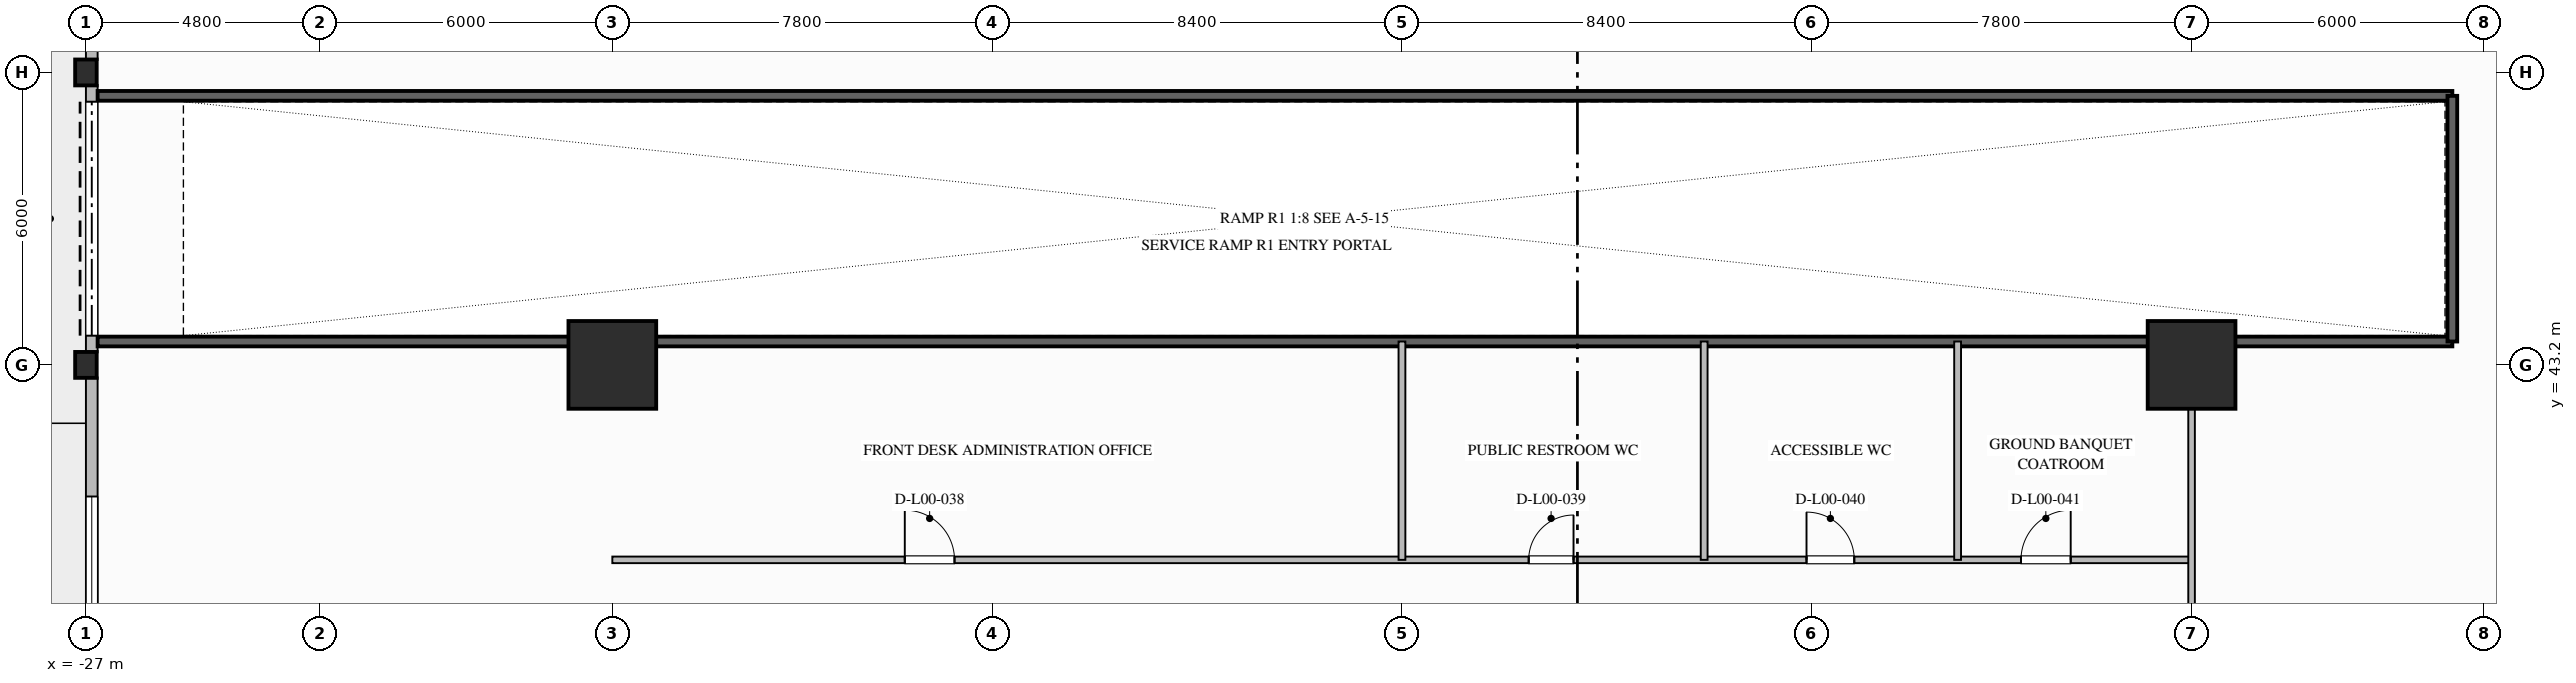
"""IFC4 building model, lengths in metres.
Left out: names, types, materials, properties, quantities, classifications, styles, units other than length and angle.
Written with IfcOpenShell. Run it as: python <this file> out.ifc"""

import sys

from ifc_helpers import new_model, si_unit, direction, frame, frame_2d, origin, origin_2d, place, context, subcontext, project, spatial, rectangle, i_section, extrude, element, fill, save


model = new_model("IFC4")
c1 = context("Model", 3, precision=1e-05, world=origin(), true_north=direction((0.0, 1.0)))
c2 = subcontext(c1, "Body", "Model", "MODEL_VIEW")
j1 = project(units=[si_unit("LENGTHUNIT", "METRE"), si_unit("PLANEANGLEUNIT", "RADIAN")], contexts=[c1])
p1 = place(None, origin())
s1 = spatial("IfcSite", under=j1, at=p1, CompositionType="ELEMENT")
p2 = place(p1, origin())
s2 = spatial("IfcBuilding", under=s1, at=p2, CompositionType="ELEMENT")
p3 = place(p2, origin())
s3 = spatial("IfcBuildingStorey", under=s2, at=p3, CompositionType="ELEMENT", Elevation=0.0)
for number, where, z_axis, x_axis in (
    (1, (-16.2, 43.2, 0.0), (0.0, 0.0, 1.0), (1.0, 0.0, 0.0)),
    (2, (16.2, 43.2, 0.0), (0.0, 0.0, 1.0), (1.0, 0.0, 0.0)),
):
    element("IfcColumn", number, at=place(p3, frame(where, z_axis=z_axis, x_axis=x_axis)), inside=s3, PredefinedType="COLUMN", context=c2, shape_type="SweptSolid", body=[
        extrude(rectangle(XDim=1.8, YDim=1.8, at=origin_2d()), origin(), (0.0, 0.0, 1.0), 5.6),
    ])
for number, where, z_axis, x_axis in (
    (3, (-27.0, 43.2, 0.0), (0.0, 0.0, 1.0), (1.0, 0.0, 0.0)),
    (4, (-27.0, 49.2, 0.0), (0.0, 0.0, 1.0), (1.0, 0.0, 0.0)),
):
    element("IfcColumn", number, at=place(p3, frame(where, z_axis=z_axis, x_axis=x_axis)), inside=s3, PredefinedType="COLUMN", context=c2, shape_type="SweptSolid", body=[
        extrude(i_section(OverallWidth=0.442, OverallDepth=0.531, WebThickness=0.066, FlangeThickness=0.106, FilletRadius=0.03, at=origin_2d()), origin(), (0.0, 0.0, 1.0), 5.6),
    ])
p4 = place(p3, frame((-26.88, 35.658, 0.0), z_axis=(0.0, 0.0, 1.0), x_axis=(0.0, 1.0, 0.0)))
e5 = element("IfcWall", 5, at=p4, inside=s3, PredefinedType="STANDARD", context=c2, shape_type="SweptSolid", body=[
    extrude(rectangle(XDim=7.285, YDim=0.24, at=frame_2d((3.642, 0.0))), origin(), (0.0, 0.0, 1.0), 4.604),
])
p5 = place(p4, frame((2.442, 0.0, 0.9)))
e6 = element("IfcOpeningElement", 6, at=p5, cuts=e5, PredefinedType="OPENING", context=c2, shape_type="SweptSolid", body=[
    extrude(rectangle(XDim=2.4, YDim=2.6, at=frame_2d((1.2, 1.3))), frame((0.0, 0.13, 0.0), z_axis=(0.0, -1.0, 0.0), x_axis=(1.0, 0.0, 0.0)), (0.0, 0.0, 1.0), 0.26),
])
p6 = place(p3, frame((-26.88, 43.458, 0.0), z_axis=(0.0, 0.0, 1.0), x_axis=(0.0, 1.0, 0.0)))
e7 = element("IfcWall", 7, at=p6, inside=s3, PredefinedType="STANDARD", context=c2, shape_type="SweptSolid", body=[
    extrude(rectangle(XDim=5.485, YDim=0.24, at=frame_2d((2.742, 0.0))), origin(), (0.0, 0.0, 1.0), 4.604),
])
p7 = place(p6, frame((0.342, 0.0, 0.0)))
e8 = element("IfcOpeningElement", 8, at=p7, cuts=e7, PredefinedType="OPENING", context=c2, shape_type="SweptSolid", body=[
    extrude(rectangle(XDim=4.8, YDim=4.5, at=frame_2d((2.4, 2.25))), frame((0.0, 0.13, 0.0), z_axis=(0.0, -1.0, 0.0), x_axis=(1.0, 0.0, 0.0)), (0.0, 0.0, 1.0), 0.26),
])
p8 = place(p3, frame((-26.88, 49.458, 0.0), z_axis=(0.0, 0.0, 1.0), x_axis=(0.0, 1.0, 0.0)))
e9 = element("IfcWall", 9, at=p8, inside=s3, PredefinedType="STANDARD", context=c2, shape_type="SweptSolid", body=[
    extrude(rectangle(XDim=1.542, YDim=0.24, at=frame_2d((0.771, 0.0))), origin(), (0.0, 0.0, 1.0), 5.3),
])
for number, where, z_axis, x_axis in (
    (10, (-26.76, 43.68, 0.0), (0.0, 0.0, 1.0), (1.0, 0.0, 0.0)),
    (11, (-26.76, 48.72, 0.0), (0.0, 0.0, 1.0), (1.0, 0.0, 0.0)),
):
    element("IfcWall", number, at=place(p3, frame(where, z_axis=z_axis, x_axis=x_axis)), inside=s3, PredefinedType="SOLIDWALL", context=c2, shape_type="SweptSolid", body=[
        extrude(rectangle(XDim=48.31, YDim=0.2, at=frame_2d((24.155, 0.0))), origin(), (0.0, 0.0, 1.0), 5.3),
    ])
p9 = place(p3, frame((21.55, 43.68, 0.0), z_axis=(0.0, 0.0, 1.0), x_axis=(0.0, 1.0, 0.0)))
e12 = element("IfcWall", 12, at=p9, inside=s3, PredefinedType="SOLIDWALL", context=c2, shape_type="SweptSolid", body=[
    extrude(rectangle(XDim=5.04, YDim=0.2, at=frame_2d((2.52, 0.0))), origin(), (0.0, 0.0, 1.0), 5.3),
])
p10 = place(p3, frame((-16.2, 39.2, 0.0), z_axis=(0.0, 0.0, 1.0), x_axis=(1.0, 0.0, 0.0)))
e13 = element("IfcWall", 13, at=p10, inside=s3, PredefinedType="PARTITIONING", context=c2, shape_type="SweptSolid", body=[
    extrude(rectangle(XDim=32.4, YDim=0.135, at=frame_2d((16.2, 0.0))), origin(), (0.0, 0.0, 1.0), 5.3),
])
p11 = place(p10, frame((6.0, 0.0, 0.0)))
e14 = element("IfcOpeningElement", 14, at=p11, cuts=e13, PredefinedType="OPENING", context=c2, shape_type="SweptSolid", body=[
    extrude(rectangle(XDim=1.02, YDim=2.15, at=frame_2d((0.51, 1.075))), frame((0.0, 0.077, 0.0), z_axis=(0.0, -1.0, 0.0), x_axis=(1.0, 0.0, 0.0)), (0.0, 0.0, 1.0), 0.155),
])
p12 = place(p10, frame((18.8, 0.0, 0.0)))
e15 = element("IfcOpeningElement", 15, at=p12, cuts=e13, PredefinedType="OPENING", context=c2, shape_type="SweptSolid", body=[
    extrude(rectangle(XDim=0.92, YDim=2.1, at=frame_2d((0.46, 1.05))), frame((0.0, 0.077, 0.0), z_axis=(0.0, -1.0, 0.0), x_axis=(1.0, 0.0, 0.0)), (0.0, 0.0, 1.0), 0.155),
])
p13 = place(p10, frame((24.5, 0.0, 0.0)))
e16 = element("IfcOpeningElement", 16, at=p13, cuts=e13, PredefinedType="OPENING", context=c2, shape_type="SweptSolid", body=[
    extrude(rectangle(XDim=0.98, YDim=2.1, at=frame_2d((0.49, 1.05))), frame((0.0, 0.077, 0.0), z_axis=(0.0, -1.0, 0.0), x_axis=(1.0, 0.0, 0.0)), (0.0, 0.0, 1.0), 0.155),
])
p14 = place(p10, frame((28.9, 0.0, 0.0)))
e17 = element("IfcOpeningElement", 17, at=p14, cuts=e13, PredefinedType="OPENING", context=c2, shape_type="SweptSolid", body=[
    extrude(rectangle(XDim=1.02, YDim=2.15, at=frame_2d((0.51, 1.075))), frame((0.0, 0.077, 0.0), z_axis=(0.0, -1.0, 0.0), x_axis=(1.0, 0.0, 0.0)), (0.0, 0.0, 1.0), 0.155),
])
p15 = place(p3, frame((16.2, 30.6, 0.0), z_axis=(0.0, 0.0, 1.0), x_axis=(0.0, 1.0, 0.0)))
e18 = element("IfcWall", 18, at=p15, inside=s3, PredefinedType="PARTITIONING", context=c2, shape_type="SweptSolid", body=[
    extrude(rectangle(XDim=13.08, YDim=0.135, at=frame_2d((6.54, 0.0))), origin(), (0.0, 0.0, 1.0), 4.337),
])
p16 = place(p3, frame((0.0, 39.2, 0.0), z_axis=(0.0, 0.0, 1.0), x_axis=(0.0, 1.0, 0.0)))
e19 = element("IfcWall", 19, at=p16, inside=s3, PredefinedType="PLUMBINGWALL", context=c2, shape_type="SweptSolid", body=[
    extrude(rectangle(XDim=4.48, YDim=0.14, at=frame_2d((2.24, 0.0))), origin(), (0.0, 0.0, 1.0), 4.512),
])
for number, where, z_axis, x_axis in (
    (20, (6.2, 39.2, 0.0), (0.0, 0.0, 1.0), (0.0, 1.0, 0.0)),
    (21, (11.4, 39.2, 0.0), (0.0, 0.0, 1.0), (0.0, 1.0, 0.0)),
):
    element("IfcWall", number, at=place(p3, frame(where, z_axis=z_axis, x_axis=x_axis)), inside=s3, PredefinedType="PLUMBINGWALL", context=c2, shape_type="SweptSolid", body=[
        extrude(rectangle(XDim=4.48, YDim=0.14, at=frame_2d((2.24, 0.0))), origin(), (0.0, 0.0, 1.0), 5.3),
    ])
p17 = place(p5, origin())
e22 = element("IfcWindow", 22, at=p17, inside=s3, PartitioningType="SINGLE_PANEL", PredefinedType="WINDOW", context=c2, shape_type="SweptSolid", body=[
    extrude(rectangle(XDim=2.4, YDim=2.6, at=frame_2d((1.2, 1.3))), frame((0.0, 0.03, 0.0), z_axis=(0.0, -1.0, 0.0), x_axis=(1.0, 0.0, 0.0)), (0.0, 0.0, 1.0), 0.06),
])
fill(e6, e22)
p18 = place(p7, origin())
e23 = element("IfcDoor", 23, at=p18, inside=s3, OperationType="ROLLINGUP", PredefinedType="GATE", context=c2, shape_type="SweptSolid", body=[
    extrude(rectangle(XDim=4.8, YDim=4.5, at=frame_2d((2.4, 2.25))), frame((0.0, 0.025, 0.0), z_axis=(0.0, -1.0, 0.0), x_axis=(1.0, 0.0, 0.0)), (0.0, 0.0, 1.0), 0.05),
])
fill(e8, e23)
p19 = place(p11, origin())
e24 = element("IfcDoor", 24, at=p19, inside=s3, OperationType="SINGLE_SWING_LEFT", PredefinedType="DOOR", context=c2, shape_type="SweptSolid", body=[
    extrude(rectangle(XDim=1.02, YDim=2.15, at=frame_2d((0.51, 1.075))), frame((0.0, 0.025, 0.0), z_axis=(0.0, -1.0, 0.0), x_axis=(1.0, 0.0, 0.0)), (0.0, 0.0, 1.0), 0.05),
])
fill(e14, e24)
p20 = place(p12, origin())
e25 = element("IfcDoor", 25, at=p20, inside=s3, OperationType="SINGLE_SWING_RIGHT", PredefinedType="DOOR", context=c2, shape_type="SweptSolid", body=[
    extrude(rectangle(XDim=0.92, YDim=2.1, at=frame_2d((0.46, 1.05))), frame((0.0, 0.025, 0.0), z_axis=(0.0, -1.0, 0.0), x_axis=(1.0, 0.0, 0.0)), (0.0, 0.0, 1.0), 0.05),
])
fill(e15, e25)
p21 = place(p13, origin())
e26 = element("IfcDoor", 26, at=p21, inside=s3, OperationType="SINGLE_SWING_LEFT", PredefinedType="DOOR", context=c2, shape_type="SweptSolid", body=[
    extrude(rectangle(XDim=0.98, YDim=2.1, at=frame_2d((0.49, 1.05))), frame((0.0, 0.025, 0.0), z_axis=(0.0, -1.0, 0.0), x_axis=(1.0, 0.0, 0.0)), (0.0, 0.0, 1.0), 0.05),
])
fill(e16, e26)
p22 = place(p14, origin())
e27 = element("IfcDoor", 27, at=p22, inside=s3, OperationType="SINGLE_SWING_RIGHT", PredefinedType="DOOR", context=c2, shape_type="SweptSolid", body=[
    extrude(rectangle(XDim=1.02, YDim=2.15, at=frame_2d((0.51, 1.075))), frame((0.0, 0.025, 0.0), z_axis=(0.0, -1.0, 0.0), x_axis=(1.0, 0.0, 0.0)), (0.0, 0.0, 1.0), 0.05),
])
fill(e17, e27)
save(model, sys.argv[1])
